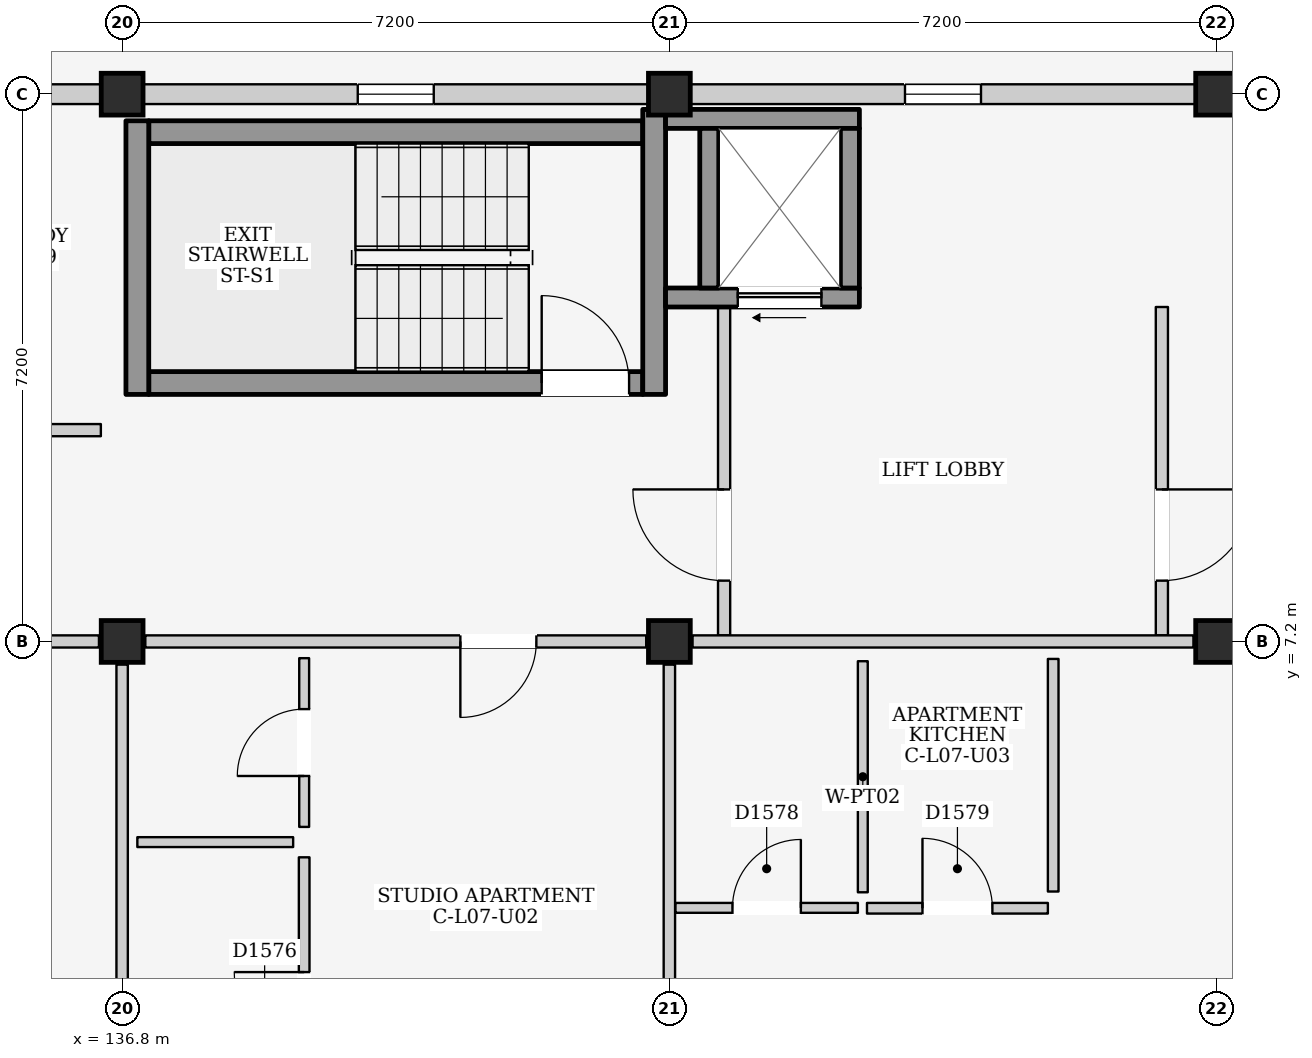
"""IFC4 building model, lengths in metres.
Left out: names, types, materials, properties, quantities, classifications, styles, units other than length and angle.
Written with IfcOpenShell. Run it as: python <this file> out.ifc"""

import sys

from ifc_helpers import new_model, si_unit, direction, frame, frame_2d, origin, origin_2d, place, context, subcontext, project, spatial, rectangle, extrude, element, fill, save


model = new_model("IFC4")
c1 = context("Model", 3, precision=1e-05, world=origin(), true_north=direction((0.0, 1.0)))
c2 = subcontext(c1, "Body", "Model", "MODEL_VIEW")
j1 = project(units=[si_unit("LENGTHUNIT", "METRE"), si_unit("PLANEANGLEUNIT", "RADIAN")], contexts=[c1])
p1 = place(None, origin())
s1 = spatial("IfcSite", under=j1, at=p1, CompositionType="ELEMENT")
p2 = place(p1, origin())
s2 = spatial("IfcBuilding", under=s1, at=p2, CompositionType="ELEMENT")
p3 = place(p2, frame((0.0, 0.0, 25.1)))
s3 = spatial("IfcBuildingStorey", under=s2, at=p3, CompositionType="ELEMENT", Elevation=25.1)
for number, where, z_axis, x_axis in (
    (1, (136.8, 7.2, 0.0), (0.0, 0.0, 1.0), (1.0, 0.0, 0.0)),
    (2, (136.8, 14.4, 0.0), (0.0, 0.0, 1.0), (1.0, 0.0, 0.0)),
    (3, (144.0, 7.2, 0.0), (0.0, 0.0, 1.0), (1.0, 0.0, 0.0)),
    (4, (144.0, 14.4, 0.0), (0.0, 0.0, 1.0), (1.0, 0.0, 0.0)),
    (5, (151.2, 7.2, 0.0), (0.0, 0.0, 1.0), (1.0, 0.0, 0.0)),
    (6, (151.2, 14.4, 0.0), (0.0, 0.0, 1.0), (1.0, 0.0, 0.0)),
):
    element("IfcColumn", number, at=place(p3, frame(where, z_axis=z_axis, x_axis=x_axis)), inside=s3, PredefinedType="COLUMN", context=c2, shape_type="SweptSolid", body=[
        extrude(rectangle(XDim=0.55, YDim=0.55, at=origin_2d()), origin(), (0.0, 0.0, 1.0), 3.2),
    ])
p4 = place(p3, frame((129.875, 14.4, 0.0), z_axis=(0.0, 0.0, 1.0), x_axis=(1.0, 0.0, 0.0)))
e7 = element("IfcWall", 7, at=p4, inside=s3, PredefinedType="ELEMENTEDWALL", context=c2, shape_type="SweptSolid", body=[
    extrude(rectangle(XDim=6.65, YDim=0.26, at=frame_2d((3.325, 0.0))), origin(), (0.0, 0.0, 1.0), 2.375),
])
p5 = place(p4, frame((1.1, 0.0, 0.0)))
e8 = element("IfcOpeningElement", 8, at=p5, cuts=e7, PredefinedType="OPENING", context=c2, shape_type="SweptSolid", body=[
    extrude(rectangle(XDim=1.5, YDim=2.12, at=frame_2d((0.75, 1.06))), frame((0.0, 0.145, 0.0), z_axis=(0.0, -1.0, 0.0), x_axis=(1.0, 0.0, 0.0)), (0.0, 0.0, 1.0), 0.29),
])
p6 = place(p4, frame((3.6, 0.0, 0.765)))
e9 = element("IfcOpeningElement", 9, at=p6, cuts=e7, PredefinedType="OPENING", context=c2, shape_type="SweptSolid", body=[
    extrude(rectangle(XDim=1.35, YDim=1.5, at=frame_2d((0.675, 0.75))), frame((0.0, 0.145, 0.0), z_axis=(0.0, -1.0, 0.0), x_axis=(1.0, 0.0, 0.0)), (0.0, 0.0, 1.0), 0.29),
])
p7 = place(p3, frame((137.075, 14.4, 0.0), z_axis=(0.0, 0.0, 1.0), x_axis=(1.0, 0.0, 0.0)))
e10 = element("IfcWall", 10, at=p7, inside=s3, PredefinedType="ELEMENTEDWALL", context=c2, shape_type="SweptSolid", body=[
    extrude(rectangle(XDim=6.65, YDim=0.26, at=frame_2d((3.325, 0.0))), origin(), (0.0, 0.0, 1.0), 2.375),
])
p8 = place(p7, frame((2.825, 0.0, 1.2)))
e11 = element("IfcOpeningElement", 11, at=p8, cuts=e10, PredefinedType="OPENING", context=c2, shape_type="SweptSolid", body=[
    extrude(rectangle(XDim=1.0, YDim=0.9, at=frame_2d((0.5, 0.45))), frame((0.0, 0.145, 0.0), z_axis=(0.0, -1.0, 0.0), x_axis=(1.0, 0.0, 0.0)), (0.0, 0.0, 1.0), 0.29),
])
p9 = place(p3, frame((144.275, 14.4, 0.0), z_axis=(0.0, 0.0, 1.0), x_axis=(1.0, 0.0, 0.0)))
e12 = element("IfcWall", 12, at=p9, inside=s3, PredefinedType="ELEMENTEDWALL", context=c2, shape_type="SweptSolid", body=[
    extrude(rectangle(XDim=6.65, YDim=0.26, at=frame_2d((3.325, 0.0))), origin(), (0.0, 0.0, 1.0), 2.375),
])
p10 = place(p9, frame((2.825, 0.0, 1.2)))
e13 = element("IfcOpeningElement", 13, at=p10, cuts=e12, PredefinedType="OPENING", context=c2, shape_type="SweptSolid", body=[
    extrude(rectangle(XDim=1.0, YDim=0.9, at=frame_2d((0.5, 0.45))), frame((0.0, 0.145, 0.0), z_axis=(0.0, -1.0, 0.0), x_axis=(1.0, 0.0, 0.0)), (0.0, 0.0, 1.0), 0.29),
])
p11 = place(p3, frame((137.15, 10.6, 0.0), z_axis=(0.0, 0.0, 1.0), x_axis=(1.0, 0.0, 0.0)))
e14 = element("IfcWall", 14, at=p11, inside=s3, PredefinedType="SHEAR", context=c2, shape_type="SweptSolid", body=[
    extrude(rectangle(XDim=6.5, YDim=0.3, at=frame_2d((3.25, 0.0))), origin(), (0.0, 0.0, 1.0), 2.99),
])
p12 = place(p11, frame((5.17, 0.0, 0.0)))
e15 = element("IfcOpeningElement", 15, at=p12, cuts=e14, PredefinedType="OPENING", context=c2, shape_type="SweptSolid", body=[
    extrude(rectangle(XDim=1.15, YDim=2.2, at=frame_2d((0.575, 1.1))), frame((0.0, 0.165, 0.0), z_axis=(0.0, -1.0, 0.0), x_axis=(1.0, 0.0, 0.0)), (0.0, 0.0, 1.0), 0.33),
])
p13 = place(p3, frame((137.15, 13.9, 0.0), z_axis=(0.0, 0.0, 1.0), x_axis=(1.0, 0.0, 0.0)))
e16 = element("IfcWall", 16, at=p13, inside=s3, PredefinedType="SHEAR", context=c2, shape_type="SweptSolid", body=[
    extrude(rectangle(XDim=6.5, YDim=0.3, at=frame_2d((3.25, 0.0))), origin(), (0.0, 0.0, 1.0), 2.99),
])
p14 = place(p3, frame((137.0, 10.45, 0.0), z_axis=(0.0, 0.0, 1.0), x_axis=(0.0, 1.0, 0.0)))
e17 = element("IfcWall", 17, at=p14, inside=s3, PredefinedType="SHEAR", context=c2, shape_type="SweptSolid", body=[
    extrude(rectangle(XDim=3.6, YDim=0.3, at=frame_2d((1.8, 0.0))), origin(), (0.0, 0.0, 1.0), 2.99),
])
p15 = place(p3, frame((143.8, 10.45, 0.0), z_axis=(0.0, 0.0, 1.0), x_axis=(0.0, 1.0, 0.0)))
e18 = element("IfcWall", 18, at=p15, inside=s3, PredefinedType="SHEAR", context=c2, shape_type="SweptSolid", body=[
    extrude(rectangle(XDim=3.75, YDim=0.3, at=frame_2d((1.875, 0.0))), origin(), (0.0, 0.0, 1.0), 2.99),
])
p16 = place(p3, frame((144.72, 7.28, 0.0), z_axis=(0.0, 0.0, 1.0), x_axis=(0.0, 1.0, 0.0)))
e19 = element("IfcWall", 19, at=p16, inside=s3, PredefinedType="PARTITIONING", context=c2, shape_type="SweptSolid", body=[
    extrude(rectangle(XDim=4.32, YDim=0.16, at=frame_2d((2.16, 0.0))), origin(), (0.0, 0.0, 1.0), 2.99),
])
p17 = place(p16, frame((0.72, 0.0, 0.0)))
e20 = element("IfcOpeningElement", 20, at=p17, cuts=e19, PredefinedType="OPENING", context=c2, shape_type="SweptSolid", body=[
    extrude(rectangle(XDim=1.2, YDim=2.2, at=frame_2d((0.6, 1.1))), frame((0.0, 0.095, 0.0), z_axis=(0.0, -1.0, 0.0), x_axis=(1.0, 0.0, 0.0)), (0.0, 0.0, 1.0), 0.19),
])
p18 = place(p3, frame((150.48, 7.28, 0.0), z_axis=(0.0, 0.0, 1.0), x_axis=(0.0, 1.0, 0.0)))
e21 = element("IfcWall", 21, at=p18, inside=s3, PredefinedType="PARTITIONING", context=c2, shape_type="SweptSolid", body=[
    extrude(rectangle(XDim=4.32, YDim=0.16, at=frame_2d((2.16, 0.0))), origin(), (0.0, 0.0, 1.0), 2.99),
])
p19 = place(p18, frame((0.72, 0.0, 0.0)))
e22 = element("IfcOpeningElement", 22, at=p19, cuts=e21, PredefinedType="OPENING", context=c2, shape_type="SweptSolid", body=[
    extrude(rectangle(XDim=1.2, YDim=2.2, at=frame_2d((0.6, 1.1))), frame((0.0, 0.095, 0.0), z_axis=(0.0, -1.0, 0.0), x_axis=(1.0, 0.0, 0.0)), (0.0, 0.0, 1.0), 0.19),
])
p20 = place(p3, frame((143.95, 11.725, 0.0), z_axis=(0.0, 0.0, 1.0), x_axis=(1.0, 0.0, 0.0)))
e23 = element("IfcWall", 23, at=p20, inside=s3, PredefinedType="SHEAR", context=c2, shape_type="SweptSolid", body=[
    extrude(rectangle(XDim=2.55, YDim=0.25, at=frame_2d((1.275, 0.0))), origin(), (0.0, 0.0, 1.0), 2.99),
])
p21 = place(p20, frame((0.95, 0.0, 0.0)))
e24 = element("IfcOpeningElement", 24, at=p21, cuts=e23, PredefinedType="OPENING", context=c2, shape_type="SweptSolid", body=[
    extrude(rectangle(XDim=1.1, YDim=2.15, at=frame_2d((0.55, 1.075))), frame((0.0, 0.14, 0.0), z_axis=(0.0, -1.0, 0.0), x_axis=(1.0, 0.0, 0.0)), (0.0, 0.0, 1.0), 0.28),
])
p22 = place(p3, frame((143.95, 14.075, 0.0), z_axis=(0.0, 0.0, 1.0), x_axis=(1.0, 0.0, 0.0)))
e25 = element("IfcWall", 25, at=p22, inside=s3, PredefinedType="SHEAR", context=c2, shape_type="SweptSolid", body=[
    extrude(rectangle(XDim=2.55, YDim=0.25, at=frame_2d((1.275, 0.0))), origin(), (0.0, 0.0, 1.0), 2.99),
])
for number, where, z_axis, x_axis in (
    (26, (144.525, 11.85, 0.0), (0.0, 0.0, 1.0), (0.0, 1.0, 0.0)),
    (27, (146.375, 11.85, 0.0), (0.0, 0.0, 1.0), (0.0, 1.0, 0.0)),
):
    element("IfcWall", number, at=place(p3, frame(where, z_axis=z_axis, x_axis=x_axis)), inside=s3, PredefinedType="SHEAR", context=c2, shape_type="SweptSolid", body=[
        extrude(rectangle(XDim=2.1, YDim=0.25, at=frame_2d((1.05, 0.0))), origin(), (0.0, 0.0, 1.0), 2.99),
    ])
p23 = place(p3, frame((129.905, 7.2, 0.0), z_axis=(0.0, 0.0, 1.0), x_axis=(1.0, 0.0, 0.0)))
e28 = element("IfcWall", 28, at=p23, inside=s3, PredefinedType="PARTITIONING", context=c2, shape_type="SweptSolid", body=[
    extrude(rectangle(XDim=6.59, YDim=0.16, at=frame_2d((3.295, 0.0))), origin(), (0.0, 0.0, 1.0), 2.375),
])
p24 = place(p23, frame((4.12, 0.0, 0.0)))
e29 = element("IfcOpeningElement", 29, at=p24, cuts=e28, PredefinedType="OPENING", context=c2, shape_type="SweptSolid", body=[
    extrude(rectangle(XDim=1.05, YDim=2.2, at=frame_2d((0.525, 1.1))), frame((0.0, 0.095, 0.0), z_axis=(0.0, -1.0, 0.0), x_axis=(1.0, 0.0, 0.0)), (0.0, 0.0, 1.0), 0.19),
])
p25 = place(p3, frame((136.8, 0.305, 0.0), z_axis=(0.0, 0.0, 1.0), x_axis=(0.0, 1.0, 0.0)))
e30 = element("IfcWall", 30, at=p25, inside=s3, PredefinedType="PARTITIONING", context=c2, shape_type="SweptSolid", body=[
    extrude(rectangle(XDim=6.59, YDim=0.15, at=frame_2d((3.295, 0.0))), origin(), (0.0, 0.0, 1.0), 2.475),
])
p26 = place(p3, frame((137.105, 7.2, 0.0), z_axis=(0.0, 0.0, 1.0), x_axis=(1.0, 0.0, 0.0)))
e31 = element("IfcWall", 31, at=p26, inside=s3, PredefinedType="PARTITIONING", context=c2, shape_type="SweptSolid", body=[
    extrude(rectangle(XDim=6.59, YDim=0.16, at=frame_2d((3.295, 0.0))), origin(), (0.0, 0.0, 1.0), 2.375),
])
p27 = place(p26, frame((4.145, 0.0, 0.0)))
e32 = element("IfcOpeningElement", 32, at=p27, cuts=e31, PredefinedType="OPENING", context=c2, shape_type="SweptSolid", body=[
    extrude(rectangle(XDim=1.0, YDim=2.15, at=frame_2d((0.5, 1.075))), frame((0.0, 0.095, 0.0), z_axis=(0.0, -1.0, 0.0), x_axis=(1.0, 0.0, 0.0)), (0.0, 0.0, 1.0), 0.19),
])
p28 = place(p3, frame((144.0, 0.305, 0.0), z_axis=(0.0, 0.0, 1.0), x_axis=(0.0, 1.0, 0.0)))
e33 = element("IfcWall", 33, at=p28, inside=s3, PredefinedType="PARTITIONING", context=c2, shape_type="SweptSolid", body=[
    extrude(rectangle(XDim=6.59, YDim=0.15, at=frame_2d((3.295, 0.0))), origin(), (0.0, 0.0, 1.0), 2.475),
])
p29 = place(p3, frame((137.0, 4.56, 0.0), z_axis=(0.0, 0.0, 1.0), x_axis=(1.0, 0.0, 0.0)))
e34 = element("IfcWall", 34, at=p29, inside=s3, PredefinedType="PARTITIONING", context=c2, shape_type="SweptSolid", body=[
    extrude(rectangle(XDim=2.05, YDim=0.13, at=frame_2d((1.025, 0.0))), origin(), (0.0, 0.0, 1.0), 2.99),
])
p30 = place(p3, frame((139.195, 4.76, 0.0), z_axis=(0.0, 0.0, 1.0), x_axis=(0.0, 1.0, 0.0)))
e35 = element("IfcWall", 35, at=p30, inside=s3, PredefinedType="PARTITIONING", context=c2, shape_type="SweptSolid", body=[
    extrude(rectangle(XDim=2.22, YDim=0.13, at=frame_2d((1.11, 0.0))), origin(), (0.0, 0.0, 1.0), 2.99),
])
p31 = place(p30, frame((0.67, 0.0, 0.0)))
e36 = element("IfcOpeningElement", 36, at=p31, cuts=e35, PredefinedType="OPENING", context=c2, shape_type="SweptSolid", body=[
    extrude(rectangle(XDim=0.88, YDim=2.1, at=frame_2d((0.44, 1.05))), frame((0.0, 0.08, 0.0), z_axis=(0.0, -1.0, 0.0), x_axis=(1.0, 0.0, 0.0)), (0.0, 0.0, 1.0), 0.16),
])
p32 = place(p3, frame((139.195, 0.42, 0.0), z_axis=(0.0, 0.0, 1.0), x_axis=(0.0, 1.0, 0.0)))
e37 = element("IfcWall", 37, at=p32, inside=s3, PredefinedType="PARTITIONING", context=c2, shape_type="SweptSolid", body=[
    extrude(rectangle(XDim=3.94, YDim=0.14, at=frame_2d((1.97, 0.0))), origin(), (0.0, 0.0, 1.0), 2.99),
])
p33 = place(p32, frame((1.51, 0.0, 0.0)))
e38 = element("IfcOpeningElement", 38, at=p33, cuts=e37, PredefinedType="OPENING", context=c2, shape_type="SweptSolid", body=[
    extrude(rectangle(XDim=0.92, YDim=2.1, at=frame_2d((0.46, 1.05))), frame((0.0, 0.085, 0.0), z_axis=(0.0, -1.0, 0.0), x_axis=(1.0, 0.0, 0.0)), (0.0, 0.0, 1.0), 0.17),
])
p34 = place(p3, frame((144.305, 7.2, 0.0), z_axis=(0.0, 0.0, 1.0), x_axis=(1.0, 0.0, 0.0)))
e39 = element("IfcWall", 39, at=p34, inside=s3, PredefinedType="PARTITIONING", context=c2, shape_type="SweptSolid", body=[
    extrude(rectangle(XDim=6.59, YDim=0.16, at=frame_2d((3.295, 0.0))), origin(), (0.0, 0.0, 1.0), 2.375),
])
p35 = place(p3, frame((144.08, 3.695, 0.0), z_axis=(0.0, 0.0, 1.0), x_axis=(1.0, 0.0, 0.0)))
e40 = element("IfcWall", 40, at=p35, inside=s3, PredefinedType="PARTITIONING", context=c2, shape_type="SweptSolid", body=[
    extrude(rectangle(XDim=2.4, YDim=0.13, at=frame_2d((1.2, 0.0))), origin(), (0.0, 0.0, 1.0), 2.99),
])
p36 = place(p35, frame((0.75, 0.0, 0.0)))
e41 = element("IfcOpeningElement", 41, at=p36, cuts=e40, PredefinedType="OPENING", context=c2, shape_type="SweptSolid", body=[
    extrude(rectangle(XDim=0.9, YDim=2.1, at=frame_2d((0.45, 1.05))), frame((0.0, 0.08, 0.0), z_axis=(0.0, -1.0, 0.0), x_axis=(1.0, 0.0, 0.0)), (0.0, 0.0, 1.0), 0.16),
])
p37 = place(p3, frame((146.545, 3.9, 0.0), z_axis=(0.0, 0.0, 1.0), x_axis=(0.0, 1.0, 0.0)))
e42 = element("IfcWall", 42, at=p37, inside=s3, PredefinedType="PARTITIONING", context=c2, shape_type="SweptSolid", body=[
    extrude(rectangle(XDim=3.04, YDim=0.13, at=frame_2d((1.52, 0.0))), origin(), (0.0, 0.0, 1.0), 2.99),
])
p38 = place(p3, frame((146.6, 3.69, 0.0), z_axis=(0.0, 0.0, 1.0), x_axis=(1.0, 0.0, 0.0)))
e43 = element("IfcWall", 43, at=p38, inside=s3, PredefinedType="PARTITIONING", context=c2, shape_type="SweptSolid", body=[
    extrude(rectangle(XDim=2.38, YDim=0.14, at=frame_2d((1.19, 0.0))), origin(), (0.0, 0.0, 1.0), 2.99),
])
p39 = place(p38, frame((0.73, 0.0, 0.0)))
e44 = element("IfcOpeningElement", 44, at=p39, cuts=e43, PredefinedType="OPENING", context=c2, shape_type="SweptSolid", body=[
    extrude(rectangle(XDim=0.92, YDim=2.1, at=frame_2d((0.46, 1.05))), frame((0.0, 0.085, 0.0), z_axis=(0.0, -1.0, 0.0), x_axis=(1.0, 0.0, 0.0)), (0.0, 0.0, 1.0), 0.17),
])
p40 = place(p3, frame((149.05, 3.91, 0.0), z_axis=(0.0, 0.0, 1.0), x_axis=(0.0, 1.0, 0.0)))
e45 = element("IfcWall", 45, at=p40, inside=s3, PredefinedType="PARTITIONING", context=c2, shape_type="SweptSolid", body=[
    extrude(rectangle(XDim=3.06, YDim=0.14, at=frame_2d((1.53, 0.0))), origin(), (0.0, 0.0, 1.0), 2.99),
])
p41 = place(p3, frame((129.88, 9.98, 0.0), z_axis=(0.0, 0.0, 1.0), x_axis=(1.0, 0.0, 0.0)))
e46 = element("IfcWall", 46, at=p41, inside=s3, PredefinedType="PARTITIONING", context=c2, shape_type="SweptSolid", body=[
    extrude(rectangle(XDim=6.64, YDim=0.16, at=frame_2d((3.32, 0.0))), origin(), (0.0, 0.0, 1.0), 2.99),
])
p42 = place(p41, frame((2.85, 0.0, 0.0)))
e47 = element("IfcOpeningElement", 47, at=p42, cuts=e46, PredefinedType="OPENING", context=c2, shape_type="SweptSolid", body=[
    extrude(rectangle(XDim=0.94, YDim=2.12, at=frame_2d((0.47, 1.06))), frame((0.0, 0.095, 0.0), z_axis=(0.0, -1.0, 0.0), x_axis=(1.0, 0.0, 0.0)), (0.0, 0.0, 1.0), 0.19),
])
p43 = place(p8, origin())
e48 = element("IfcWindow", 48, at=p43, inside=s3, PartitioningType="SINGLE_PANEL", PredefinedType="WINDOW", context=c2, shape_type="SweptSolid", body=[
    extrude(rectangle(XDim=1.0, YDim=0.9, at=frame_2d((0.5, 0.45))), frame((0.0, 0.03, 0.0), z_axis=(0.0, -1.0, 0.0), x_axis=(1.0, 0.0, 0.0)), (0.0, 0.0, 1.0), 0.06),
])
fill(e11, e48)
p44 = place(p10, origin())
e49 = element("IfcWindow", 49, at=p44, inside=s3, PartitioningType="SINGLE_PANEL", PredefinedType="WINDOW", context=c2, shape_type="SweptSolid", body=[
    extrude(rectangle(XDim=1.0, YDim=0.9, at=frame_2d((0.5, 0.45))), frame((0.0, 0.03, 0.0), z_axis=(0.0, -1.0, 0.0), x_axis=(1.0, 0.0, 0.0)), (0.0, 0.0, 1.0), 0.06),
])
fill(e13, e49)
p45 = place(p12, origin())
e50 = element("IfcDoor", 50, at=p45, inside=s3, OperationType="SINGLE_SWING_LEFT", PredefinedType="DOOR", context=c2, shape_type="SweptSolid", body=[
    extrude(rectangle(XDim=1.15, YDim=2.2, at=frame_2d((0.575, 1.1))), frame((0.0, 0.025, 0.0), z_axis=(0.0, -1.0, 0.0), x_axis=(1.0, 0.0, 0.0)), (0.0, 0.0, 1.0), 0.05),
])
fill(e15, e50)
p46 = place(p17, origin())
e51 = element("IfcDoor", 51, at=p46, inside=s3, OperationType="SINGLE_SWING_RIGHT", PredefinedType="DOOR", context=c2, shape_type="SweptSolid", body=[
    extrude(rectangle(XDim=1.2, YDim=2.2, at=frame_2d((0.6, 1.1))), frame((0.0, 0.025, 0.0), z_axis=(0.0, -1.0, 0.0), x_axis=(1.0, 0.0, 0.0)), (0.0, 0.0, 1.0), 0.05),
])
fill(e20, e51)
p47 = place(p19, frame((1.2, 0.0, 0.0), z_axis=(0.0, 0.0, 1.0), x_axis=(-1.0, 0.0, 0.0)))
e52 = element("IfcDoor", 52, at=p47, inside=s3, OperationType="SINGLE_SWING_LEFT", PredefinedType="DOOR", context=c2, shape_type="SweptSolid", body=[
    extrude(rectangle(XDim=1.2, YDim=2.2, at=frame_2d((0.6, 1.1))), frame((0.0, 0.025, 0.0), z_axis=(0.0, -1.0, 0.0), x_axis=(1.0, 0.0, 0.0)), (0.0, 0.0, 1.0), 0.05),
])
fill(e22, e52)
p48 = place(p21, frame((1.1, 0.0, 0.0), z_axis=(0.0, 0.0, 1.0), x_axis=(-1.0, 0.0, 0.0)))
e53 = element("IfcDoor", 53, at=p48, inside=s3, OperationType="SLIDING_TO_LEFT", PredefinedType="DOOR", context=c2, shape_type="SweptSolid", body=[
    extrude(rectangle(XDim=1.1, YDim=2.15, at=frame_2d((0.55, 1.075))), frame((0.0, 0.025, 0.0), z_axis=(0.0, -1.0, 0.0), x_axis=(1.0, 0.0, 0.0)), (0.0, 0.0, 1.0), 0.05),
])
fill(e24, e53)
p49 = place(p27, frame((1.0, 0.0, 0.0), z_axis=(0.0, 0.0, 1.0), x_axis=(-1.0, 0.0, 0.0)))
e54 = element("IfcDoor", 54, at=p49, inside=s3, OperationType="SINGLE_SWING_RIGHT", PredefinedType="DOOR", context=c2, shape_type="SweptSolid", body=[
    extrude(rectangle(XDim=1.0, YDim=2.15, at=frame_2d((0.5, 1.075))), frame((0.0, 0.025, 0.0), z_axis=(0.0, -1.0, 0.0), x_axis=(1.0, 0.0, 0.0)), (0.0, 0.0, 1.0), 0.05),
])
fill(e32, e54)
p50 = place(p31, origin())
e55 = element("IfcDoor", 55, at=p50, inside=s3, OperationType="SINGLE_SWING_LEFT", PredefinedType="DOOR", context=c2, shape_type="SweptSolid", body=[
    extrude(rectangle(XDim=0.88, YDim=2.1, at=frame_2d((0.44, 1.05))), frame((0.0, 0.025, 0.0), z_axis=(0.0, -1.0, 0.0), x_axis=(1.0, 0.0, 0.0)), (0.0, 0.0, 1.0), 0.05),
])
fill(e36, e55)
p51 = place(p33, origin())
e56 = element("IfcDoor", 56, at=p51, inside=s3, OperationType="SINGLE_SWING_RIGHT", PredefinedType="DOOR", context=c2, shape_type="SweptSolid", body=[
    extrude(rectangle(XDim=0.92, YDim=2.1, at=frame_2d((0.46, 1.05))), frame((0.0, 0.025, 0.0), z_axis=(0.0, -1.0, 0.0), x_axis=(1.0, 0.0, 0.0)), (0.0, 0.0, 1.0), 0.05),
])
fill(e38, e56)
p52 = place(p36, origin())
e57 = element("IfcDoor", 57, at=p52, inside=s3, OperationType="SINGLE_SWING_RIGHT", PredefinedType="DOOR", context=c2, shape_type="SweptSolid", body=[
    extrude(rectangle(XDim=0.9, YDim=2.1, at=frame_2d((0.45, 1.05))), frame((0.0, 0.025, 0.0), z_axis=(0.0, -1.0, 0.0), x_axis=(1.0, 0.0, 0.0)), (0.0, 0.0, 1.0), 0.05),
])
fill(e41, e57)
p53 = place(p39, origin())
e58 = element("IfcDoor", 58, at=p53, inside=s3, OperationType="SINGLE_SWING_LEFT", PredefinedType="DOOR", context=c2, shape_type="SweptSolid", body=[
    extrude(rectangle(XDim=0.92, YDim=2.1, at=frame_2d((0.46, 1.05))), frame((0.0, 0.025, 0.0), z_axis=(0.0, -1.0, 0.0), x_axis=(1.0, 0.0, 0.0)), (0.0, 0.0, 1.0), 0.05),
])
fill(e44, e58)
save(model, sys.argv[1])
